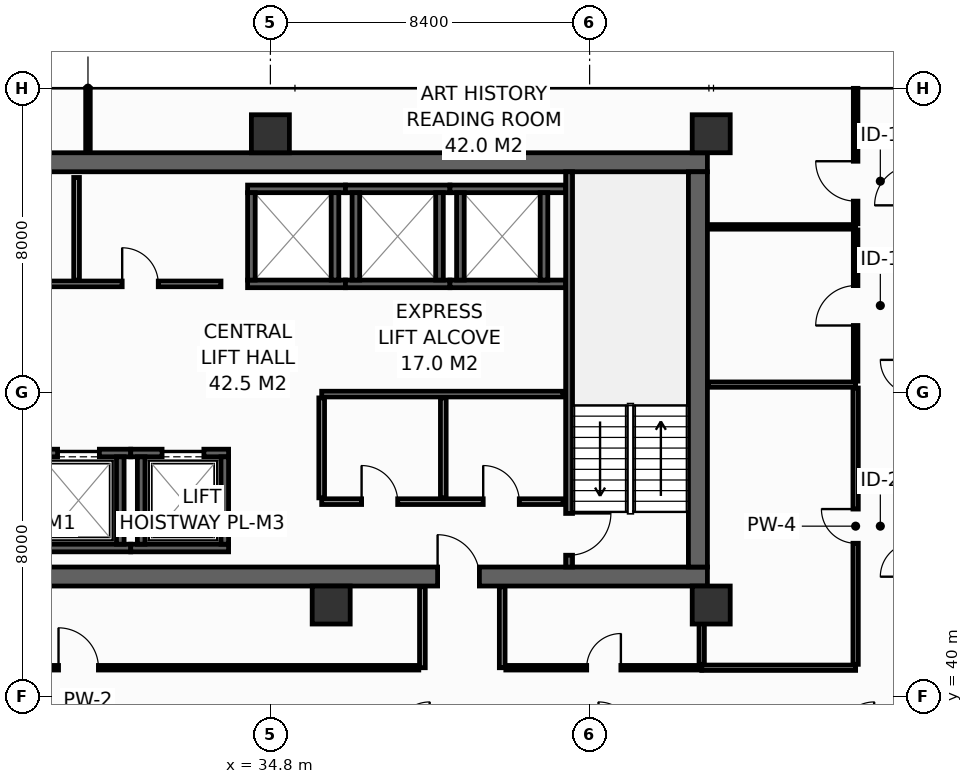
"""IFC4 building model, lengths in metres.
Left out: names, types, materials, properties, quantities, classifications, styles, units other than length and angle.
Written with IfcOpenShell. Run it as: python <this file> out.ifc"""

import sys

from ifc_helpers import new_model, si_unit, direction, frame, frame_2d, origin, origin_2d, place, context, subcontext, project, spatial, rectangle, hollow_rectangle, extrude, element, fill, save


model = new_model("IFC4")
c1 = context("Model", 3, precision=1e-05, world=origin(), true_north=direction((0.0, 1.0)))
c2 = subcontext(c1, "Body", "Model", "MODEL_VIEW")
j1 = project(units=[si_unit("LENGTHUNIT", "METRE"), si_unit("PLANEANGLEUNIT", "RADIAN")], contexts=[c1])
p1 = place(None, origin())
s1 = spatial("IfcSite", under=j1, at=p1, CompositionType="ELEMENT")
p2 = place(p1, origin())
s2 = spatial("IfcBuilding", under=s1, at=p2, CompositionType="ELEMENT")
p3 = place(p2, frame((0.0, 0.0, 133.4)))
s3 = spatial("IfcBuildingStorey", under=s2, at=p3, CompositionType="ELEMENT", Elevation=133.4)
p4 = place(p3, frame((13.6, 43.15, 0.0), z_axis=(0.0, 0.0, 1.0), x_axis=(1.0, 0.0, 0.0)))
e1 = element("IfcWall", 1, at=p4, inside=s3, PredefinedType="SHEAR", context=c2, shape_type="SweptSolid", body=[
    extrude(rectangle(XDim=32.7, YDim=0.5, at=frame_2d((16.35, 0.0))), origin(), (0.0, 0.0, 1.0), 3.55),
])
p5 = place(p4, frame((5.4, 0.0, 0.0)))
e2 = element("IfcOpeningElement", 2, at=p5, cuts=e1, PredefinedType="OPENING", context=c2, shape_type="SweptSolid", body=[
    extrude(rectangle(XDim=1.1, YDim=2.15, at=frame_2d((0.55, 1.075))), frame((0.0, 0.26, 0.0), z_axis=(0.0, -1.0, 0.0), x_axis=(1.0, 0.0, 0.0)), (0.0, 0.0, 1.0), 0.52),
])
p6 = place(p4, frame((25.6, 0.0, 0.0)))
e3 = element("IfcOpeningElement", 3, at=p6, cuts=e1, PredefinedType="OPENING", context=c2, shape_type="SweptSolid", body=[
    extrude(rectangle(XDim=1.1, YDim=2.15, at=frame_2d((0.55, 1.075))), frame((0.0, 0.26, 0.0), z_axis=(0.0, -1.0, 0.0), x_axis=(1.0, 0.0, 0.0)), (0.0, 0.0, 1.0), 0.52),
])
p7 = place(p3, frame((13.6, 54.05, 0.0), z_axis=(0.0, 0.0, 1.0), x_axis=(1.0, 0.0, 0.0)))
e4 = element("IfcWall", 4, at=p7, inside=s3, PredefinedType="SHEAR", context=c2, shape_type="SweptSolid", body=[
    extrude(rectangle(XDim=32.7, YDim=0.5, at=frame_2d((16.35, 0.0))), origin(), (0.0, 0.0, 1.0), 3.55),
])
p8 = place(p3, frame((46.05, 43.4, 0.0), z_axis=(0.0, 0.0, 1.0), x_axis=(0.0, 1.0, 0.0)))
e5 = element("IfcWall", 5, at=p8, inside=s3, PredefinedType="SHEAR", context=c2, shape_type="SweptSolid", body=[
    extrude(rectangle(XDim=10.4, YDim=0.5, at=frame_2d((5.2, 0.0))), origin(), (0.0, 0.0, 1.0), 3.55),
])
for number, where, z_axis, x_axis in (
    (6, (34.8, 54.8, 0.0), (0.0, 0.0, 1.0), (1.0, 0.0, 0.0)),
    (7, (46.4, 54.8, 0.0), (0.0, 0.0, 1.0), (1.0, 0.0, 0.0)),
    (8, (36.4, 42.4, 0.0), (0.0, 0.0, 1.0), (1.0, 0.0, 0.0)),
    (9, (46.4, 42.4, 0.0), (0.0, 0.0, 1.0), (1.0, 0.0, 0.0)),
):
    element("IfcColumn", number, at=place(p3, frame(where, z_axis=z_axis, x_axis=x_axis)), inside=s3, PredefinedType="COLUMN", context=c2, shape_type="SweptSolid", body=[
        extrude(hollow_rectangle(XDim=1.0, YDim=1.0, WallThickness=0.045, at=origin_2d()), origin(), (0.0, 0.0, 1.0), 3.8),
    ])
p9 = place(p3, frame((28.375, 43.9, 0.0), z_axis=(0.0, 0.0, 1.0), x_axis=(1.0, 0.0, 0.0)))
e10 = element("IfcWall", 10, at=p9, inside=s3, PredefinedType="SHEAR", context=c2, shape_type="SweptSolid", body=[
    extrude(rectangle(XDim=2.75, YDim=0.2, at=frame_2d((1.375, 0.0))), origin(), (0.0, 0.0, 1.0), 3.55),
])
p10 = place(p3, frame((28.375, 46.4, 0.0), z_axis=(0.0, 0.0, 1.0), x_axis=(1.0, 0.0, 0.0)))
e11 = element("IfcWall", 11, at=p10, inside=s3, PredefinedType="SHEAR", context=c2, shape_type="SweptSolid", body=[
    extrude(rectangle(XDim=2.75, YDim=0.2, at=frame_2d((1.375, 0.0))), origin(), (0.0, 0.0, 1.0), 3.55),
])
p11 = place(p10, frame((0.825, 0.0, 0.0)))
e12 = element("IfcOpeningElement", 12, at=p11, cuts=e11, PredefinedType="OPENING", context=c2, shape_type="SweptSolid", body=[
    extrude(rectangle(XDim=1.1, YDim=2.2, at=frame_2d((0.55, 1.1))), frame((0.0, 0.11, 0.0), z_axis=(0.0, -1.0, 0.0), x_axis=(1.0, 0.0, 0.0)), (0.0, 0.0, 1.0), 0.22),
])
p12 = place(p3, frame((30.85, 44.0, 0.0), z_axis=(0.0, 0.0, 1.0), x_axis=(0.0, 1.0, 0.0)))
e13 = element("IfcWall", 13, at=p12, inside=s3, PredefinedType="SHEAR", context=c2, shape_type="SweptSolid", body=[
    extrude(rectangle(XDim=2.3, YDim=0.2, at=frame_2d((1.15, 0.0))), origin(), (0.0, 0.0, 1.0), 3.55),
])
p13 = place(p3, frame((31.125, 43.9, 0.0), z_axis=(0.0, 0.0, 1.0), x_axis=(1.0, 0.0, 0.0)))
e14 = element("IfcWall", 14, at=p13, inside=s3, PredefinedType="SHEAR", context=c2, shape_type="SweptSolid", body=[
    extrude(rectangle(XDim=2.575, YDim=0.2, at=frame_2d((1.288, 0.0))), origin(), (0.0, 0.0, 1.0), 3.55),
])
p14 = place(p3, frame((31.125, 46.4, 0.0), z_axis=(0.0, 0.0, 1.0), x_axis=(1.0, 0.0, 0.0)))
e15 = element("IfcWall", 15, at=p14, inside=s3, PredefinedType="SHEAR", context=c2, shape_type="SweptSolid", body=[
    extrude(rectangle(XDim=2.575, YDim=0.2, at=frame_2d((1.288, 0.0))), origin(), (0.0, 0.0, 1.0), 3.55),
])
p15 = place(p14, frame((0.825, 0.0, 0.0)))
e16 = element("IfcOpeningElement", 16, at=p15, cuts=e15, PredefinedType="OPENING", context=c2, shape_type="SweptSolid", body=[
    extrude(rectangle(XDim=1.1, YDim=2.2, at=frame_2d((0.55, 1.1))), frame((0.0, 0.11, 0.0), z_axis=(0.0, -1.0, 0.0), x_axis=(1.0, 0.0, 0.0)), (0.0, 0.0, 1.0), 0.22),
])
for number, where, z_axis, x_axis in (
    (17, (31.4, 44.0, 0.0), (0.0, 0.0, 1.0), (0.0, 1.0, 0.0)),
    (18, (33.6, 44.0, 0.0), (0.0, 0.0, 1.0), (0.0, 1.0, 0.0)),
):
    element("IfcWall", number, at=place(p3, frame(where, z_axis=z_axis, x_axis=x_axis)), inside=s3, PredefinedType="SHEAR", context=c2, shape_type="SweptSolid", body=[
        extrude(rectangle(XDim=2.3, YDim=0.2, at=frame_2d((1.15, 0.0))), origin(), (0.0, 0.0, 1.0), 3.55),
    ])
for number, where, z_axis, x_axis in (
    (19, (34.2, 50.85, 0.0), (0.0, 0.0, 1.0), (1.0, 0.0, 0.0)),
    (20, (34.2, 53.35, 0.0), (0.0, 0.0, 1.0), (1.0, 0.0, 0.0)),
):
    element("IfcWall", number, at=place(p3, frame(where, z_axis=z_axis, x_axis=x_axis)), inside=s3, PredefinedType="SHEAR", context=c2, shape_type="SweptSolid", body=[
        extrude(rectangle(XDim=2.575, YDim=0.2, at=frame_2d((1.288, 0.0))), origin(), (0.0, 0.0, 1.0), 3.55),
    ])
for number, where, z_axis, x_axis in (
    (21, (34.3, 50.95, 0.0), (0.0, 0.0, 1.0), (0.0, 1.0, 0.0)),
    (22, (36.5, 50.95, 0.0), (0.0, 0.0, 1.0), (0.0, 1.0, 0.0)),
):
    element("IfcWall", number, at=place(p3, frame(where, z_axis=z_axis, x_axis=x_axis)), inside=s3, PredefinedType="SHEAR", context=c2, shape_type="SweptSolid", body=[
        extrude(rectangle(XDim=2.3, YDim=0.2, at=frame_2d((1.15, 0.0))), origin(), (0.0, 0.0, 1.0), 3.55),
    ])
for number, where, z_axis, x_axis in (
    (23, (36.775, 50.85, 0.0), (0.0, 0.0, 1.0), (1.0, 0.0, 0.0)),
    (24, (36.775, 53.35, 0.0), (0.0, 0.0, 1.0), (1.0, 0.0, 0.0)),
):
    element("IfcWall", number, at=place(p3, frame(where, z_axis=z_axis, x_axis=x_axis)), inside=s3, PredefinedType="SHEAR", context=c2, shape_type="SweptSolid", body=[
        extrude(rectangle(XDim=2.75, YDim=0.2, at=frame_2d((1.375, 0.0))), origin(), (0.0, 0.0, 1.0), 3.55),
    ])
for number, where, z_axis, x_axis in (
    (25, (37.05, 50.95, 0.0), (0.0, 0.0, 1.0), (0.0, 1.0, 0.0)),
    (26, (39.25, 50.95, 0.0), (0.0, 0.0, 1.0), (0.0, 1.0, 0.0)),
):
    element("IfcWall", number, at=place(p3, frame(where, z_axis=z_axis, x_axis=x_axis)), inside=s3, PredefinedType="SHEAR", context=c2, shape_type="SweptSolid", body=[
        extrude(rectangle(XDim=2.3, YDim=0.2, at=frame_2d((1.15, 0.0))), origin(), (0.0, 0.0, 1.0), 3.55),
    ])
for number, where, z_axis, x_axis in (
    (27, (39.525, 50.85, 0.0), (0.0, 0.0, 1.0), (1.0, 0.0, 0.0)),
    (28, (39.525, 53.35, 0.0), (0.0, 0.0, 1.0), (1.0, 0.0, 0.0)),
):
    element("IfcWall", number, at=place(p3, frame(where, z_axis=z_axis, x_axis=x_axis)), inside=s3, PredefinedType="SHEAR", context=c2, shape_type="SweptSolid", body=[
        extrude(rectangle(XDim=3.045, YDim=0.2, at=frame_2d((1.522, 0.0))), origin(), (0.0, 0.0, 1.0), 3.55),
    ])
for number, where, z_axis, x_axis in (
    (29, (39.8, 50.95, 0.0), (0.0, 0.0, 1.0), (0.0, 1.0, 0.0)),
    (30, (42.0, 50.95, 0.0), (0.0, 0.0, 1.0), (0.0, 1.0, 0.0)),
):
    element("IfcWall", number, at=place(p3, frame(where, z_axis=z_axis, x_axis=x_axis)), inside=s3, PredefinedType="SHEAR", context=c2, shape_type="SweptSolid", body=[
        extrude(rectangle(XDim=2.3, YDim=0.2, at=frame_2d((1.15, 0.0))), origin(), (0.0, 0.0, 1.0), 3.55),
    ])
p16 = place(p3, frame((42.66, 53.8, 0.0), z_axis=(0.0, 0.0, 1.0), x_axis=(0.0, -1.0, 0.0)))
e31 = element("IfcWall", 31, at=p16, inside=s3, PredefinedType="SHEAR", context=c2, shape_type="SweptSolid", body=[
    extrude(rectangle(XDim=10.4, YDim=0.18, at=frame_2d((5.2, 0.0))), origin(), (0.0, 0.0, 1.0), 3.55),
])
p17 = place(p16, frame((8.99, 0.0, 0.0)))
e32 = element("IfcOpeningElement", 32, at=p17, cuts=e31, PredefinedType="OPENING", context=c2, shape_type="SweptSolid", body=[
    extrude(rectangle(XDim=1.1, YDim=2.15, at=frame_2d((0.55, 1.075))), frame((0.0, 0.1, 0.0), z_axis=(0.0, -1.0, 0.0), x_axis=(1.0, 0.0, 0.0)), (0.0, 0.0, 1.0), 0.2),
])
p18 = place(p3, frame((36.15, 45.12, 0.0), z_axis=(0.0, 0.0, 1.0), x_axis=(1.0, 0.0, 0.0)))
e33 = element("IfcWall", 33, at=p18, inside=s3, PredefinedType="PARTITIONING", context=c2, shape_type="SweptSolid", body=[
    extrude(rectangle(XDim=6.35, YDim=0.15, at=frame_2d((3.175, 0.0))), origin(), (0.0, 0.0, 1.0), 3.55),
])
p19 = place(p18, frame((1.05, 0.0, 0.0)))
e34 = element("IfcOpeningElement", 34, at=p19, cuts=e33, PredefinedType="OPENING", context=c2, shape_type="SweptSolid", body=[
    extrude(rectangle(XDim=0.95, YDim=2.15, at=frame_2d((0.475, 1.075))), frame((0.0, 0.085, 0.0), z_axis=(0.0, -1.0, 0.0), x_axis=(1.0, 0.0, 0.0)), (0.0, 0.0, 1.0), 0.17),
])
p20 = place(p18, frame((4.25, 0.0, 0.0)))
e35 = element("IfcOpeningElement", 35, at=p20, cuts=e33, PredefinedType="OPENING", context=c2, shape_type="SweptSolid", body=[
    extrude(rectangle(XDim=0.95, YDim=2.15, at=frame_2d((0.475, 1.075))), frame((0.0, 0.085, 0.0), z_axis=(0.0, -1.0, 0.0), x_axis=(1.0, 0.0, 0.0)), (0.0, 0.0, 1.0), 0.17),
])
p21 = place(p3, frame((36.15, 47.95, 0.0), z_axis=(0.0, 0.0, 1.0), x_axis=(1.0, 0.0, 0.0)))
e36 = element("IfcWall", 36, at=p21, inside=s3, PredefinedType="PARTITIONING", context=c2, shape_type="SweptSolid", body=[
    extrude(rectangle(XDim=6.35, YDim=0.15, at=frame_2d((3.175, 0.0))), origin(), (0.0, 0.0, 1.0), 3.55),
])
for number, where, z_axis, x_axis in (
    (37, (36.15, 45.22, 0.0), (0.0, 0.0, 1.0), (0.0, 1.0, 0.0)),
    (38, (39.35, 45.22, 0.0), (0.0, 0.0, 1.0), (0.0, 1.0, 0.0)),
):
    element("IfcWall", number, at=place(p3, frame(where, z_axis=z_axis, x_axis=x_axis)), inside=s3, PredefinedType="PARTITIONING", context=c2, shape_type="SweptSolid", body=[
        extrude(rectangle(XDim=2.63, YDim=0.15, at=frame_2d((1.315, 0.0))), origin(), (0.0, 0.0, 1.0), 3.55),
    ])
p22 = place(p3, frame((25.85, 50.85, 0.0), z_axis=(0.0, 0.0, 1.0), x_axis=(1.0, 0.0, 0.0)))
e39 = element("IfcWall", 39, at=p22, inside=s3, PredefinedType="PARTITIONING", context=c2, shape_type="SweptSolid", body=[
    extrude(rectangle(XDim=7.65, YDim=0.15, at=frame_2d((3.825, 0.0))), origin(), (0.0, 0.0, 1.0), 3.55),
])
p23 = place(p22, frame((1.25, 0.0, 0.0)))
e40 = element("IfcOpeningElement", 40, at=p23, cuts=e39, PredefinedType="OPENING", context=c2, shape_type="SweptSolid", body=[
    extrude(rectangle(XDim=0.95, YDim=2.15, at=frame_2d((0.475, 1.075))), frame((0.0, 0.085, 0.0), z_axis=(0.0, -1.0, 0.0), x_axis=(1.0, 0.0, 0.0)), (0.0, 0.0, 1.0), 0.17),
])
p24 = place(p22, frame((5.05, 0.0, 0.0)))
e41 = element("IfcOpeningElement", 41, at=p24, cuts=e39, PredefinedType="OPENING", context=c2, shape_type="SweptSolid", body=[
    extrude(rectangle(XDim=0.95, YDim=2.15, at=frame_2d((0.475, 1.075))), frame((0.0, 0.085, 0.0), z_axis=(0.0, -1.0, 0.0), x_axis=(1.0, 0.0, 0.0)), (0.0, 0.0, 1.0), 0.17),
])
p25 = place(p3, frame((29.7, 50.95, 0.0), z_axis=(0.0, 0.0, 1.0), x_axis=(0.0, 1.0, 0.0)))
e42 = element("IfcWall", 42, at=p25, inside=s3, PredefinedType="PARTITIONING", context=c2, shape_type="SweptSolid", body=[
    extrude(rectangle(XDim=2.7, YDim=0.15, at=frame_2d((1.35, 0.0))), origin(), (0.0, 0.0, 1.0), 3.55),
])
p26 = place(p3, frame((46.15, 40.75, 0.0), z_axis=(0.0, 0.0, 1.0), x_axis=(1.0, 0.0, 0.0)))
e43 = element("IfcWall", 43, at=p26, inside=s3, PredefinedType="PARTITIONING", context=c2, shape_type="SweptSolid", body=[
    extrude(rectangle(XDim=4.05, YDim=0.14, at=frame_2d((2.025, 0.0))), origin(), (0.0, 0.0, 1.0), 3.55),
])
p27 = place(p3, frame((46.15, 40.84, 0.0), z_axis=(0.0, 0.0, 1.0), x_axis=(0.0, 1.0, 0.0)))
e44 = element("IfcWall", 44, at=p27, inside=s3, PredefinedType="PARTITIONING", context=c2, shape_type="SweptSolid", body=[
    extrude(rectangle(XDim=2.04, YDim=0.14, at=frame_2d((1.02, 0.0))), origin(), (0.0, 0.0, 1.0), 3.55),
])
p28 = place(p3, frame((46.32, 48.2, 0.0), z_axis=(0.0, 0.0, 1.0), x_axis=(1.0, 0.0, 0.0)))
e45 = element("IfcWall", 45, at=p28, inside=s3, PredefinedType="PARTITIONING", context=c2, shape_type="SweptSolid", body=[
    extrude(rectangle(XDim=3.88, YDim=0.14, at=frame_2d((1.94, 0.0))), origin(), (0.0, 0.0, 1.0), 3.55),
])
p29 = place(p3, frame((50.2, 40.84, 0.0), z_axis=(0.0, 0.0, 1.0), x_axis=(0.0, 1.0, 0.0)))
e46 = element("IfcWall", 46, at=p29, inside=s3, PredefinedType="PARTITIONING", context=c2, shape_type="SweptSolid", body=[
    extrude(rectangle(XDim=7.27, YDim=0.14, at=frame_2d((3.635, 0.0))), origin(), (0.0, 0.0, 1.0), 2.835),
])
p30 = place(p29, frame((3.185, 0.0, 0.0)))
e47 = element("IfcOpeningElement", 47, at=p30, cuts=e46, PredefinedType="OPENING", context=c2, shape_type="SweptSolid", body=[
    extrude(rectangle(XDim=0.9, YDim=2.1, at=frame_2d((0.45, 1.05))), frame((0.0, 0.08, 0.0), z_axis=(0.0, -1.0, 0.0), x_axis=(1.0, 0.0, 0.0)), (0.0, 0.0, 1.0), 0.16),
])
p31 = place(p3, frame((46.32, 52.35, 0.0), z_axis=(0.0, 0.0, 1.0), x_axis=(1.0, 0.0, 0.0)))
e48 = element("IfcWall", 48, at=p31, inside=s3, PredefinedType="PARTITIONING", context=c2, shape_type="SweptSolid", body=[
    extrude(rectangle(XDim=3.88, YDim=0.12, at=frame_2d((1.94, 0.0))), origin(), (0.0, 0.0, 1.0), 3.55),
])
p32 = place(p3, frame((30.0, 54.32, 0.0), z_axis=(0.0, 0.0, 1.0), x_axis=(0.0, 1.0, 0.0)))
e49 = element("IfcWall", 49, at=p32, inside=s3, PredefinedType="PARTITIONING", context=c2, shape_type="SweptSolid", body=[
    extrude(rectangle(XDim=1.675, YDim=0.12, at=frame_2d((0.837, 0.0))), origin(), (0.0, 0.0, 1.0), 2.935),
])
p33 = place(p3, frame((50.2, 48.29, 0.0), z_axis=(0.0, 0.0, 1.0), x_axis=(0.0, 1.0, 0.0)))
e50 = element("IfcWall", 50, at=p33, inside=s3, PredefinedType="PARTITIONING", context=c2, shape_type="SweptSolid", body=[
    extrude(rectangle(XDim=3.98, YDim=0.12, at=frame_2d((1.99, 0.0))), origin(), (0.0, 0.0, 1.0), 3.55),
])
p34 = place(p33, frame((1.465, 0.0, 0.0)))
e51 = element("IfcOpeningElement", 51, at=p34, cuts=e50, PredefinedType="OPENING", context=c2, shape_type="SweptSolid", body=[
    extrude(rectangle(XDim=1.05, YDim=2.15, at=frame_2d((0.525, 1.075))), frame((0.0, 0.07, 0.0), z_axis=(0.0, -1.0, 0.0), x_axis=(1.0, 0.0, 0.0)), (0.0, 0.0, 1.0), 0.14),
])
p35 = place(p3, frame((50.2, 52.43, 0.0), z_axis=(0.0, 0.0, 1.0), x_axis=(0.0, 1.0, 0.0)))
e52 = element("IfcWall", 52, at=p35, inside=s3, PredefinedType="PARTITIONING", context=c2, shape_type="SweptSolid", body=[
    extrude(rectangle(XDim=3.565, YDim=0.12, at=frame_2d((1.783, 0.0))), origin(), (0.0, 0.0, 1.0), 2.935),
])
p36 = place(p35, frame((0.597, 0.0, 0.0)))
e53 = element("IfcOpeningElement", 53, at=p36, cuts=e52, PredefinedType="OPENING", context=c2, shape_type="SweptSolid", body=[
    extrude(rectangle(XDim=1.05, YDim=2.15, at=frame_2d((0.525, 1.075))), frame((0.0, 0.07, 0.0), z_axis=(0.0, -1.0, 0.0), x_axis=(1.0, 0.0, 0.0)), (0.0, 0.0, 1.0), 0.14),
])
for number, where, z_axis, x_axis in (
    (54, (38.8, 40.75, 0.0), (0.0, 0.0, 1.0), (0.0, 1.0, 0.0)),
    (55, (40.9, 40.75, 0.0), (0.0, 0.0, 1.0), (0.0, 1.0, 0.0)),
):
    element("IfcWall", number, at=place(p3, frame(where, z_axis=z_axis, x_axis=x_axis)), inside=s3, PredefinedType="PARTITIONING", context=c2, shape_type="SweptSolid", body=[
        extrude(rectangle(XDim=2.13, YDim=0.15, at=frame_2d((1.065, 0.0))), origin(), (0.0, 0.0, 1.0), 3.55),
    ])
p37 = place(p3, frame((20.795, 40.75, 0.0), z_axis=(0.0, 0.0, 1.0), x_axis=(1.0, 0.0, 0.0)))
e56 = element("IfcWall", 56, at=p37, inside=s3, PredefinedType="PARTITIONING", context=c2, shape_type="SweptSolid", body=[
    extrude(rectangle(XDim=17.91, YDim=0.12, at=frame_2d((8.955, 0.0))), origin(), (0.0, 0.0, 1.0), 2.835),
])
p38 = place(p37, frame((8.43, 0.0, 0.0)))
e57 = element("IfcOpeningElement", 57, at=p38, cuts=e56, PredefinedType="OPENING", context=c2, shape_type="SweptSolid", body=[
    extrude(rectangle(XDim=1.05, YDim=2.15, at=frame_2d((0.525, 1.075))), frame((0.0, 0.07, 0.0), z_axis=(0.0, -1.0, 0.0), x_axis=(1.0, 0.0, 0.0)), (0.0, 0.0, 1.0), 0.14),
])
p39 = place(p3, frame((40.995, 40.75, 0.0), z_axis=(0.0, 0.0, 1.0), x_axis=(1.0, 0.0, 0.0)))
e58 = element("IfcWall", 58, at=p39, inside=s3, PredefinedType="PARTITIONING", context=c2, shape_type="SweptSolid", body=[
    extrude(rectangle(XDim=5.155, YDim=0.12, at=frame_2d((2.577, 0.0))), origin(), (0.0, 0.0, 1.0), 3.55),
])
p40 = place(p39, frame((2.128, 0.0, 0.0)))
e59 = element("IfcOpeningElement", 59, at=p40, cuts=e58, PredefinedType="OPENING", context=c2, shape_type="SweptSolid", body=[
    extrude(rectangle(XDim=0.9, YDim=2.1, at=frame_2d((0.45, 1.05))), frame((0.0, 0.07, 0.0), z_axis=(0.0, -1.0, 0.0), x_axis=(1.0, 0.0, 0.0)), (0.0, 0.0, 1.0), 0.14),
])
p41 = place(p11, origin())
e60 = element("IfcDoor", 60, at=p41, inside=s3, OperationType="SLIDING_TO_LEFT", PredefinedType="DOOR", context=c2, shape_type="SweptSolid", body=[
    extrude(rectangle(XDim=1.1, YDim=2.2, at=frame_2d((0.55, 1.1))), frame((0.0, 0.025, 0.0), z_axis=(0.0, -1.0, 0.0), x_axis=(1.0, 0.0, 0.0)), (0.0, 0.0, 1.0), 0.05),
])
fill(e12, e60)
p42 = place(p15, origin())
e61 = element("IfcDoor", 61, at=p42, inside=s3, OperationType="SLIDING_TO_LEFT", PredefinedType="DOOR", context=c2, shape_type="SweptSolid", body=[
    extrude(rectangle(XDim=1.1, YDim=2.2, at=frame_2d((0.55, 1.1))), frame((0.0, 0.025, 0.0), z_axis=(0.0, -1.0, 0.0), x_axis=(1.0, 0.0, 0.0)), (0.0, 0.0, 1.0), 0.05),
])
fill(e16, e61)
p43 = place(p17, origin())
e62 = element("IfcDoor", 62, at=p43, inside=s3, OperationType="SINGLE_SWING_LEFT", PredefinedType="DOOR", context=c2, shape_type="SweptSolid", body=[
    extrude(rectangle(XDim=1.1, YDim=2.15, at=frame_2d((0.55, 1.075))), frame((0.0, 0.025, 0.0), z_axis=(0.0, -1.0, 0.0), x_axis=(1.0, 0.0, 0.0)), (0.0, 0.0, 1.0), 0.05),
])
fill(e32, e62)
p44 = place(p6, origin())
e63 = element("IfcDoor", 63, at=p44, inside=s3, OperationType="SINGLE_SWING_LEFT", PredefinedType="DOOR", context=c2, shape_type="SweptSolid", body=[
    extrude(rectangle(XDim=1.1, YDim=2.15, at=frame_2d((0.55, 1.075))), frame((0.0, 0.025, 0.0), z_axis=(0.0, -1.0, 0.0), x_axis=(1.0, 0.0, 0.0)), (0.0, 0.0, 1.0), 0.05),
])
fill(e3, e63)
p45 = place(p19, origin())
e64 = element("IfcDoor", 64, at=p45, inside=s3, OperationType="SINGLE_SWING_LEFT", PredefinedType="DOOR", context=c2, shape_type="SweptSolid", body=[
    extrude(rectangle(XDim=0.95, YDim=2.15, at=frame_2d((0.475, 1.075))), frame((0.0, 0.025, 0.0), z_axis=(0.0, -1.0, 0.0), x_axis=(1.0, 0.0, 0.0)), (0.0, 0.0, 1.0), 0.05),
])
fill(e34, e64)
p46 = place(p20, origin())
e65 = element("IfcDoor", 65, at=p46, inside=s3, OperationType="SINGLE_SWING_LEFT", PredefinedType="DOOR", context=c2, shape_type="SweptSolid", body=[
    extrude(rectangle(XDim=0.95, YDim=2.15, at=frame_2d((0.475, 1.075))), frame((0.0, 0.025, 0.0), z_axis=(0.0, -1.0, 0.0), x_axis=(1.0, 0.0, 0.0)), (0.0, 0.0, 1.0), 0.05),
])
fill(e35, e65)
p47 = place(p24, origin())
e66 = element("IfcDoor", 66, at=p47, inside=s3, OperationType="SINGLE_SWING_LEFT", PredefinedType="DOOR", context=c2, shape_type="SweptSolid", body=[
    extrude(rectangle(XDim=0.95, YDim=2.15, at=frame_2d((0.475, 1.075))), frame((0.0, 0.025, 0.0), z_axis=(0.0, -1.0, 0.0), x_axis=(1.0, 0.0, 0.0)), (0.0, 0.0, 1.0), 0.05),
])
fill(e41, e66)
p48 = place(p30, origin())
e67 = element("IfcDoor", 67, at=p48, inside=s3, OperationType="SINGLE_SWING_RIGHT", PredefinedType="DOOR", context=c2, shape_type="SweptSolid", body=[
    extrude(rectangle(XDim=0.9, YDim=2.1, at=frame_2d((0.45, 1.05))), frame((0.0, 0.025, 0.0), z_axis=(0.0, -1.0, 0.0), x_axis=(1.0, 0.0, 0.0)), (0.0, 0.0, 1.0), 0.05),
])
fill(e47, e67)
p49 = place(p34, origin())
e68 = element("IfcDoor", 68, at=p49, inside=s3, OperationType="SINGLE_SWING_LEFT", PredefinedType="DOOR", context=c2, shape_type="SweptSolid", body=[
    extrude(rectangle(XDim=1.05, YDim=2.15, at=frame_2d((0.525, 1.075))), frame((0.0, 0.025, 0.0), z_axis=(0.0, -1.0, 0.0), x_axis=(1.0, 0.0, 0.0)), (0.0, 0.0, 1.0), 0.05),
])
fill(e51, e68)
p50 = place(p36, origin())
e69 = element("IfcDoor", 69, at=p50, inside=s3, OperationType="SINGLE_SWING_RIGHT", PredefinedType="DOOR", context=c2, shape_type="SweptSolid", body=[
    extrude(rectangle(XDim=1.05, YDim=2.15, at=frame_2d((0.525, 1.075))), frame((0.0, 0.025, 0.0), z_axis=(0.0, -1.0, 0.0), x_axis=(1.0, 0.0, 0.0)), (0.0, 0.0, 1.0), 0.05),
])
fill(e53, e69)
p51 = place(p38, origin())
e70 = element("IfcDoor", 70, at=p51, inside=s3, OperationType="SINGLE_SWING_LEFT", PredefinedType="DOOR", context=c2, shape_type="SweptSolid", body=[
    extrude(rectangle(XDim=1.05, YDim=2.15, at=frame_2d((0.525, 1.075))), frame((0.0, 0.025, 0.0), z_axis=(0.0, -1.0, 0.0), x_axis=(1.0, 0.0, 0.0)), (0.0, 0.0, 1.0), 0.05),
])
fill(e57, e70)
p52 = place(p40, origin())
e71 = element("IfcDoor", 71, at=p52, inside=s3, OperationType="SINGLE_SWING_RIGHT", PredefinedType="DOOR", context=c2, shape_type="SweptSolid", body=[
    extrude(rectangle(XDim=0.9, YDim=2.1, at=frame_2d((0.45, 1.05))), frame((0.0, 0.025, 0.0), z_axis=(0.0, -1.0, 0.0), x_axis=(1.0, 0.0, 0.0)), (0.0, 0.0, 1.0), 0.05),
])
fill(e59, e71)
save(model, sys.argv[1])
